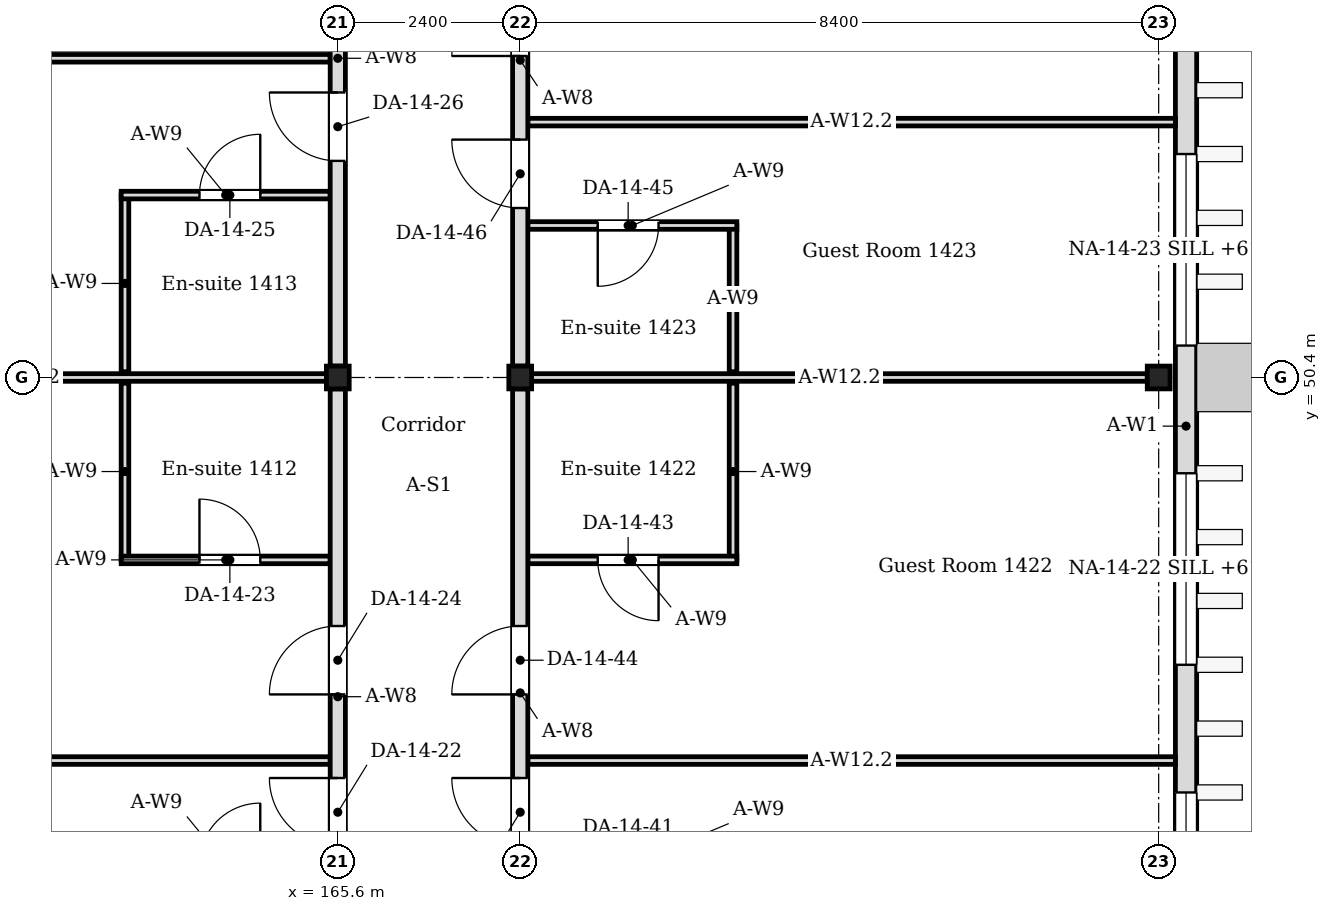
"""IFC4 building model, lengths in metres.
Left out: names, types, materials, properties, quantities, classifications, styles, units other than length and angle.
Written with IfcOpenShell. Run it as: python <this file> out.ifc"""

import sys

from ifc_helpers import new_model, si_unit, direction, frame, frame_2d, origin, origin_2d, place, context, subcontext, project, spatial, rectangle, i_section, extrude, element, fill, save


model = new_model("IFC4")
c1 = context("Model", 3, precision=1e-05, world=origin(), true_north=direction((0.0, 1.0)))
c2 = subcontext(c1, "Body", "Model", "MODEL_VIEW")
j1 = project(units=[si_unit("LENGTHUNIT", "METRE"), si_unit("PLANEANGLEUNIT", "RADIAN")], contexts=[c1])
p1 = place(None, origin())
s1 = spatial("IfcSite", under=j1, at=p1, CompositionType="ELEMENT")
p2 = place(p1, origin())
s2 = spatial("IfcBuilding", under=s1, at=p2, CompositionType="ELEMENT")
p3 = place(p2, frame((0.0, 0.0, 60.6)))
s3 = spatial("IfcBuildingStorey", under=s2, at=p3, CompositionType="ELEMENT", Elevation=60.6)
for number, where, z_axis, x_axis in (
    (1, (165.6, 50.4, 0.0), (0.0, 0.0, 1.0), (1.0, 0.0, 0.0)),
    (2, (168.0, 50.4, 0.0), (0.0, 0.0, 1.0), (1.0, 0.0, 0.0)),
    (3, (176.4, 50.4, 0.0), (0.0, 0.0, 1.0), (1.0, 0.0, 0.0)),
):
    element("IfcColumn", number, at=place(p3, frame(where, z_axis=z_axis, x_axis=x_axis)), inside=s3, PredefinedType="COLUMN", context=c2, shape_type="SweptSolid", body=[
        extrude(i_section(OverallWidth=0.3, OverallDepth=0.3, WebThickness=0.01, FlangeThickness=0.015, FilletRadius=0.013, at=origin_2d()), origin(), (0.0, 0.0, 1.0), 4.2),
    ])
p4 = place(p3, frame((176.76, -0.22, 0.0), z_axis=(0.0, 0.0, 1.0), x_axis=(0.0, 1.0, 0.0)))
e4 = element("IfcWall", 4, at=p4, inside=s3, PredefinedType="SOLIDWALL", context=c2, shape_type="SweptSolid", body=[
    extrude(rectangle(XDim=67.64, YDim=0.28, at=frame_2d((33.82, 0.0))), origin(), (0.0, 0.0, 1.0), 4.05),
])
p5 = place(p4, frame((9.88, 0.0, 0.45)))
e5 = element("IfcOpeningElement", 5, at=p5, cuts=e4, PredefinedType="OPENING", context=c2, shape_type="SweptSolid", body=[
    extrude(rectangle(XDim=2.52, YDim=2.1, at=frame_2d((1.26, 1.05))), frame((0.0, 0.15, 0.0), z_axis=(0.0, -1.0, 0.0), x_axis=(1.0, 0.0, 0.0)), (0.0, 0.0, 1.0), 0.3),
])
p6 = place(p4, frame((14.08, 0.0, 0.6)))
e6 = element("IfcOpeningElement", 6, at=p6, cuts=e4, PredefinedType="OPENING", context=c2, shape_type="SweptSolid", body=[
    extrude(rectangle(XDim=2.52, YDim=2.4, at=frame_2d((1.26, 1.2))), frame((0.0, 0.15, 0.0), z_axis=(0.0, -1.0, 0.0), x_axis=(1.0, 0.0, 0.0)), (0.0, 0.0, 1.0), 0.3),
])
p7 = place(p4, frame((17.86, 0.0, 0.6)))
e7 = element("IfcOpeningElement", 7, at=p7, cuts=e4, PredefinedType="OPENING", context=c2, shape_type="SweptSolid", body=[
    extrude(rectangle(XDim=2.52, YDim=2.4, at=frame_2d((1.26, 1.2))), frame((0.0, 0.15, 0.0), z_axis=(0.0, -1.0, 0.0), x_axis=(1.0, 0.0, 0.0)), (0.0, 0.0, 1.0), 0.3),
])
p8 = place(p4, frame((22.06, 0.0, 0.6)))
e8 = element("IfcOpeningElement", 8, at=p8, cuts=e4, PredefinedType="OPENING", context=c2, shape_type="SweptSolid", body=[
    extrude(rectangle(XDim=2.52, YDim=2.4, at=frame_2d((1.26, 1.2))), frame((0.0, 0.15, 0.0), z_axis=(0.0, -1.0, 0.0), x_axis=(1.0, 0.0, 0.0)), (0.0, 0.0, 1.0), 0.3),
])
p9 = place(p4, frame((42.64, 0.0, 0.6)))
e9 = element("IfcOpeningElement", 9, at=p9, cuts=e4, PredefinedType="OPENING", context=c2, shape_type="SweptSolid", body=[
    extrude(rectangle(XDim=2.52, YDim=2.4, at=frame_2d((1.26, 1.2))), frame((0.0, 0.15, 0.0), z_axis=(0.0, -1.0, 0.0), x_axis=(1.0, 0.0, 0.0)), (0.0, 0.0, 1.0), 0.3),
])
p10 = place(p4, frame((46.84, 0.0, 0.6)))
e10 = element("IfcOpeningElement", 10, at=p10, cuts=e4, PredefinedType="OPENING", context=c2, shape_type="SweptSolid", body=[
    extrude(rectangle(XDim=2.52, YDim=2.4, at=frame_2d((1.26, 1.2))), frame((0.0, 0.15, 0.0), z_axis=(0.0, -1.0, 0.0), x_axis=(1.0, 0.0, 0.0)), (0.0, 0.0, 1.0), 0.3),
])
p11 = place(p4, frame((51.04, 0.0, 0.6)))
e11 = element("IfcOpeningElement", 11, at=p11, cuts=e4, PredefinedType="OPENING", context=c2, shape_type="SweptSolid", body=[
    extrude(rectangle(XDim=2.52, YDim=2.4, at=frame_2d((1.26, 1.2))), frame((0.0, 0.15, 0.0), z_axis=(0.0, -1.0, 0.0), x_axis=(1.0, 0.0, 0.0)), (0.0, 0.0, 1.0), 0.3),
])
p12 = place(p4, frame((55.24, 0.0, 0.6)))
e12 = element("IfcOpeningElement", 12, at=p12, cuts=e4, PredefinedType="OPENING", context=c2, shape_type="SweptSolid", body=[
    extrude(rectangle(XDim=2.52, YDim=2.4, at=frame_2d((1.26, 1.2))), frame((0.0, 0.15, 0.0), z_axis=(0.0, -1.0, 0.0), x_axis=(1.0, 0.0, 0.0)), (0.0, 0.0, 1.0), 0.3),
])
p13 = place(p3, frame((162.8, 48.0, 0.0), z_axis=(0.0, 0.0, 1.0), x_axis=(0.0, 1.0, 0.0)))
e13 = element("IfcWall", 13, at=p13, inside=s3, PredefinedType="PARTITIONING", context=c2, shape_type="SweptSolid", body=[
    extrude(rectangle(XDim=2.325, YDim=0.1, at=frame_2d((1.163, 0.0))), origin(), (0.0, 0.0, 1.0), 4.05),
])
p14 = place(p3, frame((162.75, 48.0, 0.0), z_axis=(0.0, 0.0, 1.0), x_axis=(1.0, 0.0, 0.0)))
e14 = element("IfcWall", 14, at=p14, inside=s3, PredefinedType="PARTITIONING", context=c2, shape_type="SweptSolid", body=[
    extrude(rectangle(XDim=2.75, YDim=0.1, at=frame_2d((1.375, 0.0))), origin(), (0.0, 0.0, 1.0), 4.05),
])
p15 = place(p14, frame((1.03, 0.0, 0.0)))
e15 = element("IfcOpeningElement", 15, at=p15, cuts=e14, PredefinedType="OPENING", context=c2, shape_type="SweptSolid", body=[
    extrude(rectangle(XDim=0.8, YDim=2.1, at=frame_2d((0.4, 1.05))), frame((0.0, 0.06, 0.0), z_axis=(0.0, -1.0, 0.0), x_axis=(1.0, 0.0, 0.0)), (0.0, 0.0, 1.0), 0.12),
])
p16 = place(p3, frame((162.8, 50.475, 0.0), z_axis=(0.0, 0.0, 1.0), x_axis=(0.0, 1.0, 0.0)))
e16 = element("IfcWall", 16, at=p16, inside=s3, PredefinedType="PARTITIONING", context=c2, shape_type="SweptSolid", body=[
    extrude(rectangle(XDim=2.325, YDim=0.1, at=frame_2d((1.163, 0.0))), origin(), (0.0, 0.0, 1.0), 4.05),
])
p17 = place(p3, frame((162.75, 52.8, 0.0), z_axis=(0.0, 0.0, 1.0), x_axis=(1.0, 0.0, 0.0)))
e17 = element("IfcWall", 17, at=p17, inside=s3, PredefinedType="PARTITIONING", context=c2, shape_type="SweptSolid", body=[
    extrude(rectangle(XDim=2.75, YDim=0.1, at=frame_2d((1.375, 0.0))), origin(), (0.0, 0.0, 1.0), 4.05),
])
p18 = place(p17, frame((1.03, 0.0, 0.0)))
e18 = element("IfcOpeningElement", 18, at=p18, cuts=e17, PredefinedType="OPENING", context=c2, shape_type="SweptSolid", body=[
    extrude(rectangle(XDim=0.8, YDim=2.1, at=frame_2d((0.4, 1.05))), frame((0.0, 0.06, 0.0), z_axis=(0.0, -1.0, 0.0), x_axis=(1.0, 0.0, 0.0)), (0.0, 0.0, 1.0), 0.12),
])
p19 = place(p3, frame((170.8, 48.0, 0.0), z_axis=(0.0, 0.0, 1.0), x_axis=(0.0, 1.0, 0.0)))
e19 = element("IfcWall", 19, at=p19, inside=s3, PredefinedType="PARTITIONING", context=c2, shape_type="SweptSolid", body=[
    extrude(rectangle(XDim=2.325, YDim=0.1, at=frame_2d((1.163, 0.0))), origin(), (0.0, 0.0, 1.0), 4.05),
])
p20 = place(p3, frame((170.85, 48.0, 0.0), z_axis=(0.0, 0.0, 1.0), x_axis=(-1.0, 0.0, 0.0)))
e20 = element("IfcWall", 20, at=p20, inside=s3, PredefinedType="PARTITIONING", context=c2, shape_type="SweptSolid", body=[
    extrude(rectangle(XDim=2.75, YDim=0.1, at=frame_2d((1.375, 0.0))), origin(), (0.0, 0.0, 1.0), 4.05),
])
p21 = place(p20, frame((1.03, 0.0, 0.0)))
e21 = element("IfcOpeningElement", 21, at=p21, cuts=e20, PredefinedType="OPENING", context=c2, shape_type="SweptSolid", body=[
    extrude(rectangle(XDim=0.8, YDim=2.1, at=frame_2d((0.4, 1.05))), frame((0.0, 0.06, 0.0), z_axis=(0.0, -1.0, 0.0), x_axis=(1.0, 0.0, 0.0)), (0.0, 0.0, 1.0), 0.12),
])
p22 = place(p3, frame((170.8, 50.475, 0.0), z_axis=(0.0, 0.0, 1.0), x_axis=(0.0, 1.0, 0.0)))
e22 = element("IfcWall", 22, at=p22, inside=s3, PredefinedType="PARTITIONING", context=c2, shape_type="SweptSolid", body=[
    extrude(rectangle(XDim=1.925, YDim=0.1, at=frame_2d((0.962, 0.0))), origin(), (0.0, 0.0, 1.0), 4.05),
])
p23 = place(p3, frame((170.85, 52.4, 0.0), z_axis=(0.0, 0.0, 1.0), x_axis=(-1.0, 0.0, 0.0)))
e23 = element("IfcWall", 23, at=p23, inside=s3, PredefinedType="PARTITIONING", context=c2, shape_type="SweptSolid", body=[
    extrude(rectangle(XDim=2.75, YDim=0.1, at=frame_2d((1.375, 0.0))), origin(), (0.0, 0.0, 1.0), 4.05),
])
p24 = place(p23, frame((1.03, 0.0, 0.0)))
e24 = element("IfcOpeningElement", 24, at=p24, cuts=e23, PredefinedType="OPENING", context=c2, shape_type="SweptSolid", body=[
    extrude(rectangle(XDim=0.8, YDim=2.1, at=frame_2d((0.4, 1.05))), frame((0.0, 0.06, 0.0), z_axis=(0.0, -1.0, 0.0), x_axis=(1.0, 0.0, 0.0)), (0.0, 0.0, 1.0), 0.12),
])
p25 = place(p3, frame((157.35, 50.4, 0.0), z_axis=(0.0, 0.0, 1.0), x_axis=(1.0, 0.0, 0.0)))
e25 = element("IfcWall", 25, at=p25, inside=s3, PredefinedType="PARTITIONING", context=c2, shape_type="SweptSolid", body=[
    extrude(rectangle(XDim=8.1, YDim=0.1, at=frame_2d((4.05, 0.0))), origin(), (0.0, 0.0, 1.0), 3.55),
])
p26 = place(p3, frame((168.15, 50.4, 0.0), z_axis=(0.0, 0.0, 1.0), x_axis=(1.0, 0.0, 0.0)))
e26 = element("IfcWall", 26, at=p26, inside=s3, PredefinedType="PARTITIONING", context=c2, shape_type="SweptSolid", body=[
    extrude(rectangle(XDim=8.1, YDim=0.1, at=frame_2d((4.05, 0.0))), origin(), (0.0, 0.0, 1.0), 3.55),
])
for number, where, z_axis, x_axis in (
    (27, (156.98, 45.36, 0.0), (0.0, 0.0, 1.0), (1.0, 0.0, 0.0)),
    (28, (156.98, 54.6, 0.0), (0.0, 0.0, 1.0), (1.0, 0.0, 0.0)),
    (29, (168.1, 45.36, 0.0), (0.0, 0.0, 1.0), (1.0, 0.0, 0.0)),
    (30, (168.1, 53.76, 0.0), (0.0, 0.0, 1.0), (1.0, 0.0, 0.0)),
):
    element("IfcWall", number, at=place(p3, frame(where, z_axis=z_axis, x_axis=x_axis)), inside=s3, PredefinedType="PARTITIONING", context=c2, shape_type="SweptSolid", body=[
        extrude(rectangle(XDim=8.52, YDim=0.1, at=frame_2d((4.26, 0.0))), origin(), (0.0, 0.0, 1.0), 3.55),
    ])
p27 = place(p3, frame((165.6, 42.15, 0.0), z_axis=(0.0, 0.0, 1.0), x_axis=(0.0, 1.0, 0.0)))
e31 = element("IfcWall", 31, at=p27, inside=s3, PredefinedType="PARTITIONING", context=c2, shape_type="SweptSolid", body=[
    extrude(rectangle(XDim=8.1, YDim=0.2, at=frame_2d((4.05, 0.0))), origin(), (0.0, 0.0, 1.0), 3.45),
])
p28 = place(p27, frame((2.08, 0.0, 0.0)))
e32 = element("IfcOpeningElement", 32, at=p28, cuts=e31, PredefinedType="OPENING", context=c2, shape_type="SweptSolid", body=[
    extrude(rectangle(XDim=0.9, YDim=2.1, at=frame_2d((0.45, 1.05))), frame((0.0, 0.11, 0.0), z_axis=(0.0, -1.0, 0.0), x_axis=(1.0, 0.0, 0.0)), (0.0, 0.0, 1.0), 0.22),
])
p29 = place(p27, frame((4.08, 0.0, 0.0)))
e33 = element("IfcOpeningElement", 33, at=p29, cuts=e31, PredefinedType="OPENING", context=c2, shape_type="SweptSolid", body=[
    extrude(rectangle(XDim=0.9, YDim=2.1, at=frame_2d((0.45, 1.05))), frame((0.0, 0.11, 0.0), z_axis=(0.0, -1.0, 0.0), x_axis=(1.0, 0.0, 0.0)), (0.0, 0.0, 1.0), 0.22),
])
p30 = place(p3, frame((165.6, 50.55, 0.0), z_axis=(0.0, 0.0, 1.0), x_axis=(0.0, 1.0, 0.0)))
e34 = element("IfcWall", 34, at=p30, inside=s3, PredefinedType="PARTITIONING", context=c2, shape_type="SweptSolid", body=[
    extrude(rectangle(XDim=8.1, YDim=0.2, at=frame_2d((4.05, 0.0))), origin(), (0.0, 0.0, 1.0), 3.45),
])
p31 = place(p30, frame((2.7, 0.0, 0.0)))
e35 = element("IfcOpeningElement", 35, at=p31, cuts=e34, PredefinedType="OPENING", context=c2, shape_type="SweptSolid", body=[
    extrude(rectangle(XDim=0.9, YDim=2.1, at=frame_2d((0.45, 1.05))), frame((0.0, 0.11, 0.0), z_axis=(0.0, -1.0, 0.0), x_axis=(1.0, 0.0, 0.0)), (0.0, 0.0, 1.0), 0.22),
])
p32 = place(p30, frame((4.5, 0.0, 0.0)))
e36 = element("IfcOpeningElement", 36, at=p32, cuts=e34, PredefinedType="OPENING", context=c2, shape_type="SweptSolid", body=[
    extrude(rectangle(XDim=0.9, YDim=2.1, at=frame_2d((0.45, 1.05))), frame((0.0, 0.11, 0.0), z_axis=(0.0, -1.0, 0.0), x_axis=(1.0, 0.0, 0.0)), (0.0, 0.0, 1.0), 0.22),
])
p33 = place(p3, frame((168.0, 42.25, 0.0), z_axis=(0.0, 0.0, 1.0), x_axis=(0.0, 1.0, 0.0)))
e37 = element("IfcWall", 37, at=p33, inside=s3, PredefinedType="PARTITIONING", context=c2, shape_type="SweptSolid", body=[
    extrude(rectangle(XDim=8.0, YDim=0.2, at=frame_2d((4.0, 0.0))), origin(), (0.0, 0.0, 1.0), 3.45),
])
p34 = place(p33, frame((1.98, 0.0, 0.0)))
e38 = element("IfcOpeningElement", 38, at=p34, cuts=e37, PredefinedType="OPENING", context=c2, shape_type="SweptSolid", body=[
    extrude(rectangle(XDim=0.9, YDim=2.1, at=frame_2d((0.45, 1.05))), frame((0.0, 0.11, 0.0), z_axis=(0.0, -1.0, 0.0), x_axis=(1.0, 0.0, 0.0)), (0.0, 0.0, 1.0), 0.22),
])
p35 = place(p33, frame((3.98, 0.0, 0.0)))
e39 = element("IfcOpeningElement", 39, at=p35, cuts=e37, PredefinedType="OPENING", context=c2, shape_type="SweptSolid", body=[
    extrude(rectangle(XDim=0.9, YDim=2.1, at=frame_2d((0.45, 1.05))), frame((0.0, 0.11, 0.0), z_axis=(0.0, -1.0, 0.0), x_axis=(1.0, 0.0, 0.0)), (0.0, 0.0, 1.0), 0.22),
])
p36 = place(p3, frame((168.0, 50.55, 0.0), z_axis=(0.0, 0.0, 1.0), x_axis=(0.0, 1.0, 0.0)))
e40 = element("IfcWall", 40, at=p36, inside=s3, PredefinedType="PARTITIONING", context=c2, shape_type="SweptSolid", body=[
    extrude(rectangle(XDim=8.05, YDim=0.2, at=frame_2d((4.025, 0.0))), origin(), (0.0, 0.0, 1.0), 3.45),
])
p37 = place(p36, frame((2.08, 0.0, 0.0)))
e41 = element("IfcOpeningElement", 41, at=p37, cuts=e40, PredefinedType="OPENING", context=c2, shape_type="SweptSolid", body=[
    extrude(rectangle(XDim=0.9, YDim=2.1, at=frame_2d((0.45, 1.05))), frame((0.0, 0.11, 0.0), z_axis=(0.0, -1.0, 0.0), x_axis=(1.0, 0.0, 0.0)), (0.0, 0.0, 1.0), 0.22),
])
p38 = place(p36, frame((4.08, 0.0, 0.0)))
e42 = element("IfcOpeningElement", 42, at=p38, cuts=e40, PredefinedType="OPENING", context=c2, shape_type="SweptSolid", body=[
    extrude(rectangle(XDim=0.9, YDim=2.1, at=frame_2d((0.45, 1.05))), frame((0.0, 0.11, 0.0), z_axis=(0.0, -1.0, 0.0), x_axis=(1.0, 0.0, 0.0)), (0.0, 0.0, 1.0), 0.22),
])
p39 = place(p9, origin())
e43 = element("IfcWindow", 43, at=p39, inside=s3, PartitioningType="SINGLE_PANEL", PredefinedType="WINDOW", context=c2, shape_type="SweptSolid", body=[
    extrude(rectangle(XDim=2.52, YDim=2.4, at=frame_2d((1.26, 1.2))), frame((0.0, 0.03, 0.0), z_axis=(0.0, -1.0, 0.0), x_axis=(1.0, 0.0, 0.0)), (0.0, 0.0, 1.0), 0.06),
])
fill(e9, e43)
p40 = place(p10, origin())
e44 = element("IfcWindow", 44, at=p40, inside=s3, PartitioningType="SINGLE_PANEL", PredefinedType="WINDOW", context=c2, shape_type="SweptSolid", body=[
    extrude(rectangle(XDim=2.52, YDim=2.4, at=frame_2d((1.26, 1.2))), frame((0.0, 0.03, 0.0), z_axis=(0.0, -1.0, 0.0), x_axis=(1.0, 0.0, 0.0)), (0.0, 0.0, 1.0), 0.06),
])
fill(e10, e44)
p41 = place(p11, origin())
e45 = element("IfcWindow", 45, at=p41, inside=s3, PartitioningType="SINGLE_PANEL", PredefinedType="WINDOW", context=c2, shape_type="SweptSolid", body=[
    extrude(rectangle(XDim=2.52, YDim=2.4, at=frame_2d((1.26, 1.2))), frame((0.0, 0.03, 0.0), z_axis=(0.0, -1.0, 0.0), x_axis=(1.0, 0.0, 0.0)), (0.0, 0.0, 1.0), 0.06),
])
fill(e11, e45)
p42 = place(p28, origin())
e46 = element("IfcDoor", 46, at=p42, inside=s3, OperationType="SINGLE_SWING_RIGHT", PredefinedType="DOOR", context=c2, shape_type="SweptSolid", body=[
    extrude(rectangle(XDim=0.9, YDim=2.1, at=frame_2d((0.45, 1.05))), frame((0.0, 0.025, 0.0), z_axis=(0.0, -1.0, 0.0), x_axis=(1.0, 0.0, 0.0)), (0.0, 0.0, 1.0), 0.05),
])
fill(e32, e46)
p43 = place(p15, origin())
e47 = element("IfcDoor", 47, at=p43, inside=s3, OperationType="SINGLE_SWING_LEFT", PredefinedType="DOOR", context=c2, shape_type="SweptSolid", body=[
    extrude(rectangle(XDim=0.8, YDim=2.1, at=frame_2d((0.4, 1.05))), frame((0.0, 0.025, 0.0), z_axis=(0.0, -1.0, 0.0), x_axis=(1.0, 0.0, 0.0)), (0.0, 0.0, 1.0), 0.05),
])
fill(e15, e47)
p44 = place(p29, origin())
e48 = element("IfcDoor", 48, at=p44, inside=s3, OperationType="SINGLE_SWING_LEFT", PredefinedType="DOOR", context=c2, shape_type="SweptSolid", body=[
    extrude(rectangle(XDim=0.9, YDim=2.1, at=frame_2d((0.45, 1.05))), frame((0.0, 0.025, 0.0), z_axis=(0.0, -1.0, 0.0), x_axis=(1.0, 0.0, 0.0)), (0.0, 0.0, 1.0), 0.05),
])
fill(e33, e48)
p45 = place(p18, origin())
e49 = element("IfcDoor", 49, at=p45, inside=s3, OperationType="SINGLE_SWING_RIGHT", PredefinedType="DOOR", context=c2, shape_type="SweptSolid", body=[
    extrude(rectangle(XDim=0.8, YDim=2.1, at=frame_2d((0.4, 1.05))), frame((0.0, 0.025, 0.0), z_axis=(0.0, -1.0, 0.0), x_axis=(1.0, 0.0, 0.0)), (0.0, 0.0, 1.0), 0.05),
])
fill(e18, e49)
p46 = place(p31, origin())
e50 = element("IfcDoor", 50, at=p46, inside=s3, OperationType="SINGLE_SWING_RIGHT", PredefinedType="DOOR", context=c2, shape_type="SweptSolid", body=[
    extrude(rectangle(XDim=0.9, YDim=2.1, at=frame_2d((0.45, 1.05))), frame((0.0, 0.025, 0.0), z_axis=(0.0, -1.0, 0.0), x_axis=(1.0, 0.0, 0.0)), (0.0, 0.0, 1.0), 0.05),
])
fill(e35, e50)
p47 = place(p34, origin())
e51 = element("IfcDoor", 51, at=p47, inside=s3, OperationType="SINGLE_SWING_RIGHT", PredefinedType="DOOR", context=c2, shape_type="SweptSolid", body=[
    extrude(rectangle(XDim=0.9, YDim=2.1, at=frame_2d((0.45, 1.05))), frame((0.0, 0.025, 0.0), z_axis=(0.0, -1.0, 0.0), x_axis=(1.0, 0.0, 0.0)), (0.0, 0.0, 1.0), 0.05),
])
fill(e38, e51)
p48 = place(p21, origin())
e52 = element("IfcDoor", 52, at=p48, inside=s3, OperationType="SINGLE_SWING_LEFT", PredefinedType="DOOR", context=c2, shape_type="SweptSolid", body=[
    extrude(rectangle(XDim=0.8, YDim=2.1, at=frame_2d((0.4, 1.05))), frame((0.0, 0.025, 0.0), z_axis=(0.0, -1.0, 0.0), x_axis=(1.0, 0.0, 0.0)), (0.0, 0.0, 1.0), 0.05),
])
fill(e21, e52)
p49 = place(p35, origin())
e53 = element("IfcDoor", 53, at=p49, inside=s3, OperationType="SINGLE_SWING_LEFT", PredefinedType="DOOR", context=c2, shape_type="SweptSolid", body=[
    extrude(rectangle(XDim=0.9, YDim=2.1, at=frame_2d((0.45, 1.05))), frame((0.0, 0.025, 0.0), z_axis=(0.0, -1.0, 0.0), x_axis=(1.0, 0.0, 0.0)), (0.0, 0.0, 1.0), 0.05),
])
fill(e39, e53)
p50 = place(p24, origin())
e54 = element("IfcDoor", 54, at=p50, inside=s3, OperationType="SINGLE_SWING_RIGHT", PredefinedType="DOOR", context=c2, shape_type="SweptSolid", body=[
    extrude(rectangle(XDim=0.8, YDim=2.1, at=frame_2d((0.4, 1.05))), frame((0.0, 0.025, 0.0), z_axis=(0.0, -1.0, 0.0), x_axis=(1.0, 0.0, 0.0)), (0.0, 0.0, 1.0), 0.05),
])
fill(e24, e54)
p51 = place(p37, origin())
e55 = element("IfcDoor", 55, at=p51, inside=s3, OperationType="SINGLE_SWING_RIGHT", PredefinedType="DOOR", context=c2, shape_type="SweptSolid", body=[
    extrude(rectangle(XDim=0.9, YDim=2.1, at=frame_2d((0.45, 1.05))), frame((0.0, 0.025, 0.0), z_axis=(0.0, -1.0, 0.0), x_axis=(1.0, 0.0, 0.0)), (0.0, 0.0, 1.0), 0.05),
])
fill(e41, e55)
p52 = place(p38, origin())
e56 = element("IfcDoor", 56, at=p52, inside=s3, OperationType="SINGLE_SWING_LEFT", PredefinedType="DOOR", context=c2, shape_type="SweptSolid", body=[
    extrude(rectangle(XDim=0.9, YDim=2.1, at=frame_2d((0.45, 1.05))), frame((0.0, 0.025, 0.0), z_axis=(0.0, -1.0, 0.0), x_axis=(1.0, 0.0, 0.0)), (0.0, 0.0, 1.0), 0.05),
])
fill(e42, e56)
save(model, sys.argv[1])
